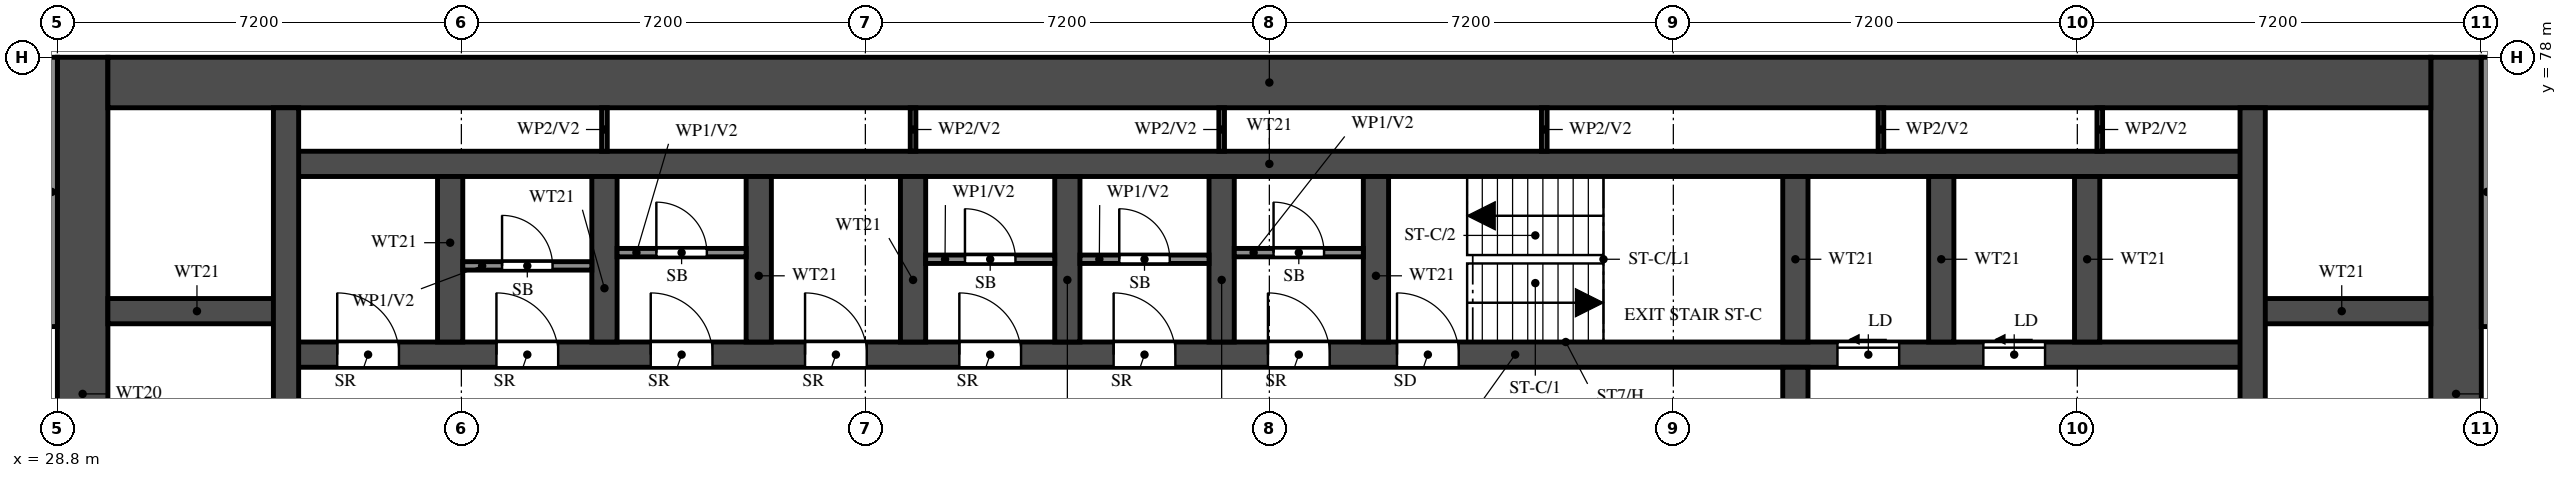
"""IFC4 building model, lengths in metres.
Left out: names, types, materials, properties, quantities, classifications, styles, units other than length and angle.
Written with IfcOpenShell. Run it as: python <this file> out.ifc"""

import sys

from ifc_helpers import new_model, si_unit, direction, frame, frame_2d, origin, place, context, subcontext, project, spatial, rectangle, extrude, element, fill, save


model = new_model("IFC4")
c1 = context("Model", 3, precision=1e-05, world=origin(), true_north=direction((0.0, 1.0)))
c2 = subcontext(c1, "Body", "Model", "MODEL_VIEW")
j1 = project(units=[si_unit("LENGTHUNIT", "METRE"), si_unit("PLANEANGLEUNIT", "RADIAN")], contexts=[c1])
p1 = place(None, origin())
s1 = spatial("IfcSite", under=j1, at=p1, CompositionType="ELEMENT")
p2 = place(p1, origin())
s2 = spatial("IfcBuilding", under=s1, at=p2, CompositionType="ELEMENT")
p3 = place(p2, frame((0.0, 0.0, 48.0)))
s3 = spatial("IfcBuildingStorey", under=s2, at=p3, CompositionType="ELEMENT", Elevation=48.0)
for number, where, z_axis, x_axis in (
    (1, (29.25, 66.0, 0.0), (0.0, 0.0, 1.0), (0.0, 1.0, 0.0)),
    (2, (71.55, 66.0, 0.0), (0.0, 0.0, 1.0), (0.0, 1.0, 0.0)),
):
    element("IfcWall", number, at=place(p3, frame(where, z_axis=z_axis, x_axis=x_axis)), inside=s3, PredefinedType="SHEAR", context=c2, shape_type="SweptSolid", body=[
        extrude(rectangle(XDim=12.0, YDim=0.9, at=frame_2d((6.0, 0.0))), origin(), (0.0, 0.0, 1.0), 3.18),
    ])
p4 = place(p3, frame((29.7, 77.55, 0.0), z_axis=(0.0, 0.0, 1.0), x_axis=(1.0, 0.0, 0.0)))
e3 = element("IfcWall", 3, at=p4, inside=s3, PredefinedType="SHEAR", context=c2, shape_type="SweptSolid", body=[
    extrude(rectangle(XDim=41.4, YDim=0.9, at=frame_2d((20.7, 0.0))), origin(), (0.0, 0.0, 1.0), 3.18),
])
p5 = place(p3, frame((32.875, 72.7, 0.0), z_axis=(0.0, 0.0, 1.0), x_axis=(1.0, 0.0, 0.0)))
e4 = element("IfcWall", 4, at=p5, inside=s3, PredefinedType="SHEAR", context=c2, shape_type="SweptSolid", body=[
    extrude(rectangle(XDim=35.05, YDim=0.45, at=frame_2d((17.525, 0.0))), origin(), (0.0, 0.0, 1.0), 3.18),
])
p6 = place(p5, frame((19.8, 0.0, 0.0)))
e5 = element("IfcOpeningElement", 5, at=p6, cuts=e4, PredefinedType="OPENING", context=c2, shape_type="SweptSolid", body=[
    extrude(rectangle(XDim=1.1, YDim=2.1, at=frame_2d((0.55, 1.05))), frame((0.0, 0.235, 0.0), z_axis=(0.0, -1.0, 0.0), x_axis=(1.0, 0.0, 0.0)), (0.0, 0.0, 1.0), 0.47),
])
p7 = place(p5, frame((27.65, 0.0, 0.0)))
e6 = element("IfcOpeningElement", 6, at=p7, cuts=e4, PredefinedType="OPENING", context=c2, shape_type="SweptSolid", body=[
    extrude(rectangle(XDim=1.1, YDim=2.1, at=frame_2d((0.55, 1.05))), frame((0.0, 0.235, 0.0), z_axis=(0.0, -1.0, 0.0), x_axis=(1.0, 0.0, 0.0)), (0.0, 0.0, 1.0), 0.47),
])
p8 = place(p5, frame((30.25, 0.0, 0.0)))
e7 = element("IfcOpeningElement", 7, at=p8, cuts=e4, PredefinedType="OPENING", context=c2, shape_type="SweptSolid", body=[
    extrude(rectangle(XDim=1.1, YDim=2.1, at=frame_2d((0.55, 1.05))), frame((0.0, 0.235, 0.0), z_axis=(0.0, -1.0, 0.0), x_axis=(1.0, 0.0, 0.0)), (0.0, 0.0, 1.0), 0.47),
])
p9 = place(p5, frame((3.75, 0.0, 0.0)))
e8 = element("IfcOpeningElement", 8, at=p9, cuts=e4, PredefinedType="OPENING", context=c2, shape_type="SweptSolid", body=[
    extrude(rectangle(XDim=1.1, YDim=2.1, at=frame_2d((0.55, 1.05))), frame((0.0, 0.235, 0.0), z_axis=(0.0, -1.0, 0.0), x_axis=(1.0, 0.0, 0.0)), (0.0, 0.0, 1.0), 0.47),
])
p10 = place(p5, frame((6.5, 0.0, 0.0)))
e9 = element("IfcOpeningElement", 9, at=p10, cuts=e4, PredefinedType="OPENING", context=c2, shape_type="SweptSolid", body=[
    extrude(rectangle(XDim=1.1, YDim=2.1, at=frame_2d((0.55, 1.05))), frame((0.0, 0.235, 0.0), z_axis=(0.0, -1.0, 0.0), x_axis=(1.0, 0.0, 0.0)), (0.0, 0.0, 1.0), 0.47),
])
p11 = place(p5, frame((9.25, 0.0, 0.0)))
e10 = element("IfcOpeningElement", 10, at=p11, cuts=e4, PredefinedType="OPENING", context=c2, shape_type="SweptSolid", body=[
    extrude(rectangle(XDim=1.1, YDim=2.1, at=frame_2d((0.55, 1.05))), frame((0.0, 0.235, 0.0), z_axis=(0.0, -1.0, 0.0), x_axis=(1.0, 0.0, 0.0)), (0.0, 0.0, 1.0), 0.47),
])
p12 = place(p5, frame((12.0, 0.0, 0.0)))
e11 = element("IfcOpeningElement", 11, at=p12, cuts=e4, PredefinedType="OPENING", context=c2, shape_type="SweptSolid", body=[
    extrude(rectangle(XDim=1.1, YDim=2.1, at=frame_2d((0.55, 1.05))), frame((0.0, 0.235, 0.0), z_axis=(0.0, -1.0, 0.0), x_axis=(1.0, 0.0, 0.0)), (0.0, 0.0, 1.0), 0.47),
])
p13 = place(p5, frame((14.75, 0.0, 0.0)))
e12 = element("IfcOpeningElement", 12, at=p13, cuts=e4, PredefinedType="OPENING", context=c2, shape_type="SweptSolid", body=[
    extrude(rectangle(XDim=1.1, YDim=2.1, at=frame_2d((0.55, 1.05))), frame((0.0, 0.235, 0.0), z_axis=(0.0, -1.0, 0.0), x_axis=(1.0, 0.0, 0.0)), (0.0, 0.0, 1.0), 0.47),
])
p14 = place(p5, frame((17.5, 0.0, 0.0)))
e13 = element("IfcOpeningElement", 13, at=p14, cuts=e4, PredefinedType="OPENING", context=c2, shape_type="SweptSolid", body=[
    extrude(rectangle(XDim=1.1, YDim=2.1, at=frame_2d((0.55, 1.05))), frame((0.0, 0.235, 0.0), z_axis=(0.0, -1.0, 0.0), x_axis=(1.0, 0.0, 0.0)), (0.0, 0.0, 1.0), 0.47),
])
p15 = place(p5, frame((0.913, 0.0, 0.0)))
e14 = element("IfcOpeningElement", 14, at=p15, cuts=e4, PredefinedType="OPENING", context=c2, shape_type="SweptSolid", body=[
    extrude(rectangle(XDim=1.1, YDim=2.1, at=frame_2d((0.55, 1.05))), frame((0.0, 0.235, 0.0), z_axis=(0.0, -1.0, 0.0), x_axis=(1.0, 0.0, 0.0)), (0.0, 0.0, 1.0), 0.47),
])
p16 = place(p3, frame((32.875, 76.1, 0.0), z_axis=(0.0, 0.0, 1.0), x_axis=(1.0, 0.0, 0.0)))
e15 = element("IfcWall", 15, at=p16, inside=s3, PredefinedType="SHEAR", context=c2, shape_type="SweptSolid", body=[
    extrude(rectangle(XDim=35.05, YDim=0.45, at=frame_2d((17.525, 0.0))), origin(), (0.0, 0.0, 1.0), 3.18),
])
for number, where, z_axis, x_axis in (
    (16, (29.7, 73.475, 0.0), (0.0, 0.0, 1.0), (1.0, 0.0, 0.0)),
    (17, (67.925, 73.475, 0.0), (0.0, 0.0, 1.0), (1.0, 0.0, 0.0)),
):
    element("IfcWall", number, at=place(p3, frame(where, z_axis=z_axis, x_axis=x_axis)), inside=s3, PredefinedType="SHEAR", context=c2, shape_type="SweptSolid", body=[
        extrude(rectangle(XDim=3.175, YDim=0.45, at=frame_2d((1.587, 0.0))), origin(), (0.0, 0.0, 1.0), 3.18),
    ])
p17 = place(p3, frame((32.875, 66.45, 0.0), z_axis=(0.0, 0.0, 1.0), x_axis=(0.0, 1.0, 0.0)))
e18 = element("IfcWall", 18, at=p17, inside=s3, PredefinedType="SHEAR", context=c2, shape_type="SweptSolid", body=[
    extrude(rectangle(XDim=10.65, YDim=0.45, at=frame_2d((5.325, 0.0))), origin(), (0.0, 0.0, 1.0), 3.18),
])
p18 = place(p3, frame((67.925, 66.45, 0.0), z_axis=(0.0, 0.0, 1.0), x_axis=(0.0, 1.0, 0.0)))
e19 = element("IfcWall", 19, at=p18, inside=s3, PredefinedType="SHEAR", context=c2, shape_type="SweptSolid", body=[
    extrude(rectangle(XDim=10.65, YDim=0.45, at=frame_2d((5.325, 0.0))), origin(), (0.0, 0.0, 1.0), 3.18),
])
p19 = place(p18, frame((0.15, 0.0, 0.0)))
e20 = element("IfcOpeningElement", 20, at=p19, cuts=e19, PredefinedType="OPENING", context=c2, shape_type="SweptSolid", body=[
    extrude(rectangle(XDim=1.1, YDim=2.1, at=frame_2d((0.55, 1.05))), frame((0.0, 0.235, 0.0), z_axis=(0.0, -1.0, 0.0), x_axis=(1.0, 0.0, 0.0)), (0.0, 0.0, 1.0), 0.47),
])
p20 = place(p3, frame((59.775, 66.45, 0.0), z_axis=(0.0, 0.0, 1.0), x_axis=(0.0, 1.0, 0.0)))
e21 = element("IfcWall", 21, at=p20, inside=s3, PredefinedType="SHEAR", context=c2, shape_type="SweptSolid", body=[
    extrude(rectangle(XDim=6.025, YDim=0.45, at=frame_2d((3.013, 0.0))), origin(), (0.0, 0.0, 1.0), 3.18),
])
p21 = place(p20, frame((3.85, 0.0, 0.0)))
e22 = element("IfcOpeningElement", 22, at=p21, cuts=e21, PredefinedType="OPENING", context=c2, shape_type="SweptSolid", body=[
    extrude(rectangle(XDim=1.2, YDim=2.1, at=frame_2d((0.6, 1.05))), frame((0.0, 0.235, 0.0), z_axis=(0.0, -1.0, 0.0), x_axis=(1.0, 0.0, 0.0)), (0.0, 0.0, 1.0), 0.47),
])
for number, where, z_axis, x_axis in (
    (23, (59.775, 72.925, 0.0), (0.0, 0.0, 1.0), (0.0, 1.0, 0.0)),
    (24, (35.8, 72.925, 0.0), (0.0, 0.0, 1.0), (0.0, 1.0, 0.0)),
    (25, (38.55, 72.925, 0.0), (0.0, 0.0, 1.0), (0.0, 1.0, 0.0)),
    (26, (41.3, 72.925, 0.0), (0.0, 0.0, 1.0), (0.0, 1.0, 0.0)),
    (27, (44.05, 72.925, 0.0), (0.0, 0.0, 1.0), (0.0, 1.0, 0.0)),
    (28, (46.8, 72.925, 0.0), (0.0, 0.0, 1.0), (0.0, 1.0, 0.0)),
    (29, (49.55, 72.925, 0.0), (0.0, 0.0, 1.0), (0.0, 1.0, 0.0)),
    (30, (52.3, 72.925, 0.0), (0.0, 0.0, 1.0), (0.0, 1.0, 0.0)),
    (31, (62.375, 72.925, 0.0), (0.0, 0.0, 1.0), (0.0, 1.0, 0.0)),
    (32, (64.975, 72.925, 0.0), (0.0, 0.0, 1.0), (0.0, 1.0, 0.0)),
):
    element("IfcWall", number, at=place(p3, frame(where, z_axis=z_axis, x_axis=x_axis)), inside=s3, PredefinedType="SHEAR", context=c2, shape_type="SweptSolid", body=[
        extrude(rectangle(XDim=2.95, YDim=0.45, at=frame_2d((1.475, 0.0))), origin(), (0.0, 0.0, 1.0), 3.18),
    ])
p22 = place(p3, frame((36.025, 74.282, 0.0), z_axis=(0.0, 0.0, 1.0), x_axis=(1.0, 0.0, 0.0)))
e33 = element("IfcWall", 33, at=p22, inside=s3, PredefinedType="PARTITIONING", context=c2, shape_type="SweptSolid", body=[
    extrude(rectangle(XDim=2.3, YDim=0.15, at=frame_2d((1.15, 0.0))), origin(), (0.0, 0.0, 1.0), 3.18),
])
p23 = place(p22, frame((0.7, 0.0, 0.0)))
e34 = element("IfcOpeningElement", 34, at=p23, cuts=e33, PredefinedType="OPENING", context=c2, shape_type="SweptSolid", body=[
    extrude(rectangle(XDim=0.9, YDim=2.1, at=frame_2d((0.45, 1.05))), frame((0.0, 0.085, 0.0), z_axis=(0.0, -1.0, 0.0), x_axis=(1.0, 0.0, 0.0)), (0.0, 0.0, 1.0), 0.17),
])
p24 = place(p3, frame((38.775, 74.518, 0.0), z_axis=(0.0, 0.0, 1.0), x_axis=(1.0, 0.0, 0.0)))
e35 = element("IfcWall", 35, at=p24, inside=s3, PredefinedType="PARTITIONING", context=c2, shape_type="SweptSolid", body=[
    extrude(rectangle(XDim=2.3, YDim=0.15, at=frame_2d((1.15, 0.0))), origin(), (0.0, 0.0, 1.0), 3.18),
])
p25 = place(p24, frame((0.7, 0.0, 0.0)))
e36 = element("IfcOpeningElement", 36, at=p25, cuts=e35, PredefinedType="OPENING", context=c2, shape_type="SweptSolid", body=[
    extrude(rectangle(XDim=0.9, YDim=2.1, at=frame_2d((0.45, 1.05))), frame((0.0, 0.085, 0.0), z_axis=(0.0, -1.0, 0.0), x_axis=(1.0, 0.0, 0.0)), (0.0, 0.0, 1.0), 0.17),
])
p26 = place(p3, frame((44.275, 74.4, 0.0), z_axis=(0.0, 0.0, 1.0), x_axis=(1.0, 0.0, 0.0)))
e37 = element("IfcWall", 37, at=p26, inside=s3, PredefinedType="PARTITIONING", context=c2, shape_type="SweptSolid", body=[
    extrude(rectangle(XDim=2.3, YDim=0.15, at=frame_2d((1.15, 0.0))), origin(), (0.0, 0.0, 1.0), 3.18),
])
p27 = place(p26, frame((0.7, 0.0, 0.0)))
e38 = element("IfcOpeningElement", 38, at=p27, cuts=e37, PredefinedType="OPENING", context=c2, shape_type="SweptSolid", body=[
    extrude(rectangle(XDim=0.9, YDim=2.1, at=frame_2d((0.45, 1.05))), frame((0.0, 0.085, 0.0), z_axis=(0.0, -1.0, 0.0), x_axis=(1.0, 0.0, 0.0)), (0.0, 0.0, 1.0), 0.17),
])
p28 = place(p3, frame((47.025, 74.4, 0.0), z_axis=(0.0, 0.0, 1.0), x_axis=(1.0, 0.0, 0.0)))
e39 = element("IfcWall", 39, at=p28, inside=s3, PredefinedType="PARTITIONING", context=c2, shape_type="SweptSolid", body=[
    extrude(rectangle(XDim=2.3, YDim=0.15, at=frame_2d((1.15, 0.0))), origin(), (0.0, 0.0, 1.0), 3.18),
])
p29 = place(p28, frame((0.7, 0.0, 0.0)))
e40 = element("IfcOpeningElement", 40, at=p29, cuts=e39, PredefinedType="OPENING", context=c2, shape_type="SweptSolid", body=[
    extrude(rectangle(XDim=0.9, YDim=2.1, at=frame_2d((0.45, 1.05))), frame((0.0, 0.085, 0.0), z_axis=(0.0, -1.0, 0.0), x_axis=(1.0, 0.0, 0.0)), (0.0, 0.0, 1.0), 0.17),
])
p30 = place(p3, frame((49.775, 74.518, 0.0), z_axis=(0.0, 0.0, 1.0), x_axis=(1.0, 0.0, 0.0)))
e41 = element("IfcWall", 41, at=p30, inside=s3, PredefinedType="PARTITIONING", context=c2, shape_type="SweptSolid", body=[
    extrude(rectangle(XDim=2.3, YDim=0.15, at=frame_2d((1.15, 0.0))), origin(), (0.0, 0.0, 1.0), 3.18),
])
p31 = place(p30, frame((0.7, 0.0, 0.0)))
e42 = element("IfcOpeningElement", 42, at=p31, cuts=e41, PredefinedType="OPENING", context=c2, shape_type="SweptSolid", body=[
    extrude(rectangle(XDim=0.9, YDim=2.1, at=frame_2d((0.45, 1.05))), frame((0.0, 0.085, 0.0), z_axis=(0.0, -1.0, 0.0), x_axis=(1.0, 0.0, 0.0)), (0.0, 0.0, 1.0), 0.17),
])
for number, where, z_axis, x_axis in (
    (43, (38.55, 76.325, 0.0), (0.0, 0.0, 1.0), (0.0, 1.0, 0.0)),
    (44, (44.05, 76.325, 0.0), (0.0, 0.0, 1.0), (0.0, 1.0, 0.0)),
    (45, (49.55, 76.325, 0.0), (0.0, 0.0, 1.0), (0.0, 1.0, 0.0)),
    (46, (55.3, 76.325, 0.0), (0.0, 0.0, 1.0), (0.0, 1.0, 0.0)),
    (47, (61.3, 76.325, 0.0), (0.0, 0.0, 1.0), (0.0, 1.0, 0.0)),
    (48, (65.2, 76.325, 0.0), (0.0, 0.0, 1.0), (0.0, 1.0, 0.0)),
):
    element("IfcWall", number, at=place(p3, frame(where, z_axis=z_axis, x_axis=x_axis)), inside=s3, PredefinedType="PARTITIONING", context=c2, shape_type="SweptSolid", body=[
        extrude(rectangle(XDim=0.775, YDim=0.1, at=frame_2d((0.388, 0.0))), origin(), (0.0, 0.0, 1.0), 3.18),
    ])
for number, where, z_axis, x_axis in (
    (49, (28.7, 73.2, 0.0), (0.0, 0.0, 1.0), (0.0, 1.0, 0.0)),
    (50, (72.1, 73.2, 0.0), (0.0, 0.0, 1.0), (0.0, 1.0, 0.0)),
):
    element("IfcWall", number, at=place(p3, frame(where, z_axis=z_axis, x_axis=x_axis)), inside=s3, PredefinedType="SOLIDWALL", context=c2, shape_type="SweptSolid", body=[
        extrude(rectangle(XDim=4.8, YDim=0.2, at=frame_2d((2.4, 0.0))), origin(), (0.0, 0.0, 1.0), 3.18),
    ])
p32 = place(p6, origin())
e51 = element("IfcDoor", 51, at=p32, inside=s3, OperationType="SINGLE_SWING_LEFT", PredefinedType="DOOR", context=c2, shape_type="SweptSolid", body=[
    extrude(rectangle(XDim=1.1, YDim=2.1, at=frame_2d((0.55, 1.05))), frame((0.0, 0.025, 0.0), z_axis=(0.0, -1.0, 0.0), x_axis=(1.0, 0.0, 0.0)), (0.0, 0.0, 1.0), 0.05),
])
fill(e5, e51)
p33 = place(p7, origin())
e52 = element("IfcDoor", 52, at=p33, inside=s3, OperationType="SLIDING_TO_LEFT", PredefinedType="DOOR", context=c2, shape_type="SweptSolid", body=[
    extrude(rectangle(XDim=1.1, YDim=2.1, at=frame_2d((0.55, 1.05))), frame((0.0, 0.025, 0.0), z_axis=(0.0, -1.0, 0.0), x_axis=(1.0, 0.0, 0.0)), (0.0, 0.0, 1.0), 0.05),
])
fill(e6, e52)
p34 = place(p8, origin())
e53 = element("IfcDoor", 53, at=p34, inside=s3, OperationType="SLIDING_TO_LEFT", PredefinedType="DOOR", context=c2, shape_type="SweptSolid", body=[
    extrude(rectangle(XDim=1.1, YDim=2.1, at=frame_2d((0.55, 1.05))), frame((0.0, 0.025, 0.0), z_axis=(0.0, -1.0, 0.0), x_axis=(1.0, 0.0, 0.0)), (0.0, 0.0, 1.0), 0.05),
])
fill(e7, e53)
p35 = place(p9, origin())
e54 = element("IfcDoor", 54, at=p35, inside=s3, OperationType="SINGLE_SWING_LEFT", PredefinedType="DOOR", context=c2, shape_type="SweptSolid", body=[
    extrude(rectangle(XDim=1.1, YDim=2.1, at=frame_2d((0.55, 1.05))), frame((0.0, 0.025, 0.0), z_axis=(0.0, -1.0, 0.0), x_axis=(1.0, 0.0, 0.0)), (0.0, 0.0, 1.0), 0.05),
])
fill(e8, e54)
p36 = place(p23, origin())
e55 = element("IfcDoor", 55, at=p36, inside=s3, OperationType="SINGLE_SWING_LEFT", PredefinedType="DOOR", context=c2, shape_type="SweptSolid", body=[
    extrude(rectangle(XDim=0.9, YDim=2.1, at=frame_2d((0.45, 1.05))), frame((0.0, 0.025, 0.0), z_axis=(0.0, -1.0, 0.0), x_axis=(1.0, 0.0, 0.0)), (0.0, 0.0, 1.0), 0.05),
])
fill(e34, e55)
p37 = place(p10, origin())
e56 = element("IfcDoor", 56, at=p37, inside=s3, OperationType="SINGLE_SWING_LEFT", PredefinedType="DOOR", context=c2, shape_type="SweptSolid", body=[
    extrude(rectangle(XDim=1.1, YDim=2.1, at=frame_2d((0.55, 1.05))), frame((0.0, 0.025, 0.0), z_axis=(0.0, -1.0, 0.0), x_axis=(1.0, 0.0, 0.0)), (0.0, 0.0, 1.0), 0.05),
])
fill(e9, e56)
p38 = place(p25, origin())
e57 = element("IfcDoor", 57, at=p38, inside=s3, OperationType="SINGLE_SWING_LEFT", PredefinedType="DOOR", context=c2, shape_type="SweptSolid", body=[
    extrude(rectangle(XDim=0.9, YDim=2.1, at=frame_2d((0.45, 1.05))), frame((0.0, 0.025, 0.0), z_axis=(0.0, -1.0, 0.0), x_axis=(1.0, 0.0, 0.0)), (0.0, 0.0, 1.0), 0.05),
])
fill(e36, e57)
p39 = place(p11, origin())
e58 = element("IfcDoor", 58, at=p39, inside=s3, OperationType="SINGLE_SWING_LEFT", PredefinedType="DOOR", context=c2, shape_type="SweptSolid", body=[
    extrude(rectangle(XDim=1.1, YDim=2.1, at=frame_2d((0.55, 1.05))), frame((0.0, 0.025, 0.0), z_axis=(0.0, -1.0, 0.0), x_axis=(1.0, 0.0, 0.0)), (0.0, 0.0, 1.0), 0.05),
])
fill(e10, e58)
p40 = place(p12, origin())
e59 = element("IfcDoor", 59, at=p40, inside=s3, OperationType="SINGLE_SWING_LEFT", PredefinedType="DOOR", context=c2, shape_type="SweptSolid", body=[
    extrude(rectangle(XDim=1.1, YDim=2.1, at=frame_2d((0.55, 1.05))), frame((0.0, 0.025, 0.0), z_axis=(0.0, -1.0, 0.0), x_axis=(1.0, 0.0, 0.0)), (0.0, 0.0, 1.0), 0.05),
])
fill(e11, e59)
p41 = place(p27, origin())
e60 = element("IfcDoor", 60, at=p41, inside=s3, OperationType="SINGLE_SWING_RIGHT", PredefinedType="DOOR", context=c2, shape_type="SweptSolid", body=[
    extrude(rectangle(XDim=0.9, YDim=2.1, at=frame_2d((0.45, 1.05))), frame((0.0, 0.025, 0.0), z_axis=(0.0, -1.0, 0.0), x_axis=(1.0, 0.0, 0.0)), (0.0, 0.0, 1.0), 0.05),
])
fill(e38, e60)
p42 = place(p13, origin())
e61 = element("IfcDoor", 61, at=p42, inside=s3, OperationType="SINGLE_SWING_LEFT", PredefinedType="DOOR", context=c2, shape_type="SweptSolid", body=[
    extrude(rectangle(XDim=1.1, YDim=2.1, at=frame_2d((0.55, 1.05))), frame((0.0, 0.025, 0.0), z_axis=(0.0, -1.0, 0.0), x_axis=(1.0, 0.0, 0.0)), (0.0, 0.0, 1.0), 0.05),
])
fill(e12, e61)
p43 = place(p29, origin())
e62 = element("IfcDoor", 62, at=p43, inside=s3, OperationType="SINGLE_SWING_LEFT", PredefinedType="DOOR", context=c2, shape_type="SweptSolid", body=[
    extrude(rectangle(XDim=0.9, YDim=2.1, at=frame_2d((0.45, 1.05))), frame((0.0, 0.025, 0.0), z_axis=(0.0, -1.0, 0.0), x_axis=(1.0, 0.0, 0.0)), (0.0, 0.0, 1.0), 0.05),
])
fill(e40, e62)
p44 = place(p14, origin())
e63 = element("IfcDoor", 63, at=p44, inside=s3, OperationType="SINGLE_SWING_LEFT", PredefinedType="DOOR", context=c2, shape_type="SweptSolid", body=[
    extrude(rectangle(XDim=1.1, YDim=2.1, at=frame_2d((0.55, 1.05))), frame((0.0, 0.025, 0.0), z_axis=(0.0, -1.0, 0.0), x_axis=(1.0, 0.0, 0.0)), (0.0, 0.0, 1.0), 0.05),
])
fill(e13, e63)
p45 = place(p31, origin())
e64 = element("IfcDoor", 64, at=p45, inside=s3, OperationType="SINGLE_SWING_LEFT", PredefinedType="DOOR", context=c2, shape_type="SweptSolid", body=[
    extrude(rectangle(XDim=0.9, YDim=2.1, at=frame_2d((0.45, 1.05))), frame((0.0, 0.025, 0.0), z_axis=(0.0, -1.0, 0.0), x_axis=(1.0, 0.0, 0.0)), (0.0, 0.0, 1.0), 0.05),
])
fill(e42, e64)
p46 = place(p15, origin())
e65 = element("IfcDoor", 65, at=p46, inside=s3, OperationType="SINGLE_SWING_LEFT", PredefinedType="DOOR", context=c2, shape_type="SweptSolid", body=[
    extrude(rectangle(XDim=1.1, YDim=2.1, at=frame_2d((0.55, 1.05))), frame((0.0, 0.025, 0.0), z_axis=(0.0, -1.0, 0.0), x_axis=(1.0, 0.0, 0.0)), (0.0, 0.0, 1.0), 0.05),
])
fill(e14, e65)
save(model, sys.argv[1])
